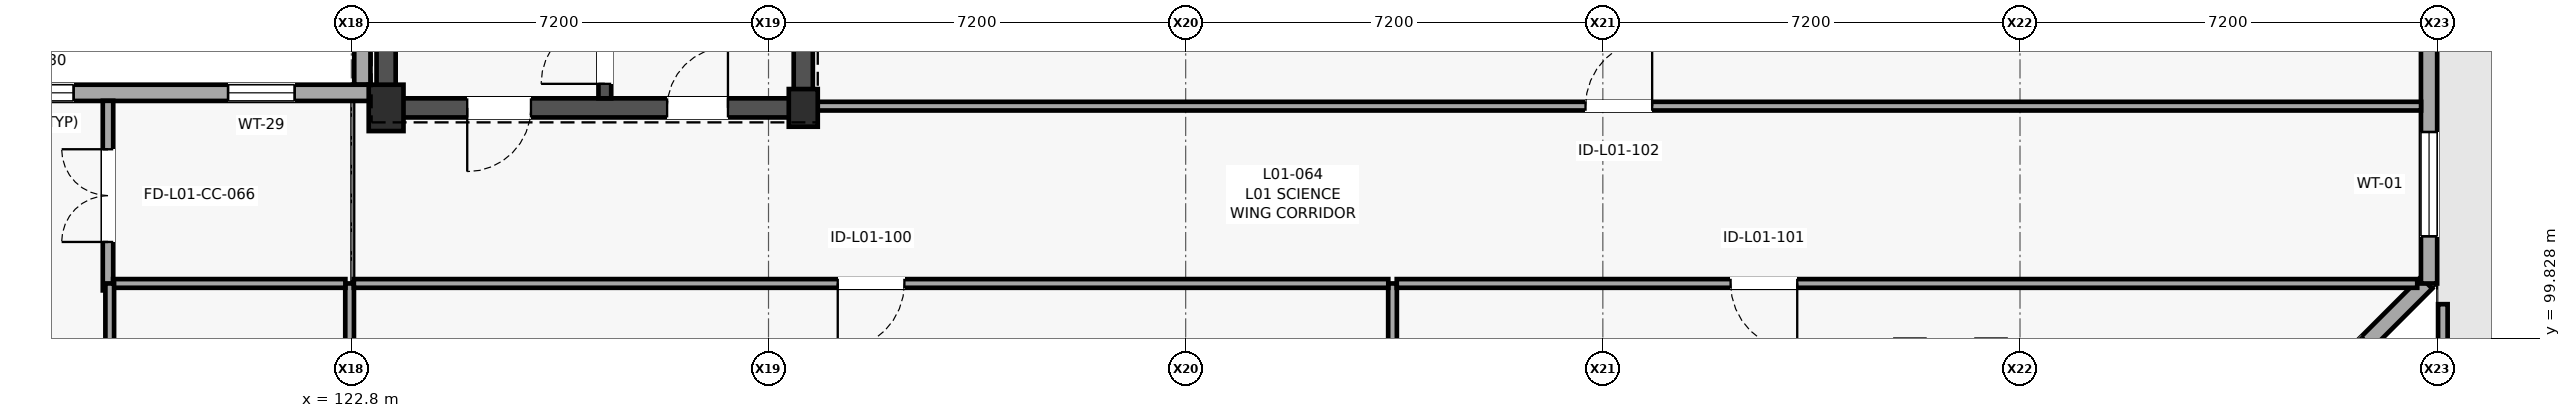
"""IFC4 building model, lengths in metres.
Left out: names, types, materials, properties, quantities, classifications, styles, units other than length and angle.
Written with IfcOpenShell. Run it as: python <this file> out.ifc"""

import sys

from ifc_helpers import new_model, si_unit, direction, frame, frame_2d, origin, origin_2d, place, context, subcontext, project, spatial, rectangle, extrude, element, fill, save


model = new_model("IFC4")
c1 = context("Model", 3, precision=1e-05, world=origin(), true_north=direction((0.0, 1.0)))
c2 = subcontext(c1, "Body", "Model", "MODEL_VIEW")
j1 = project(units=[si_unit("LENGTHUNIT", "METRE"), si_unit("PLANEANGLEUNIT", "RADIAN")], contexts=[c1])
p1 = place(None, origin())
s1 = spatial("IfcSite", under=j1, at=p1, CompositionType="ELEMENT")
p2 = place(p1, origin())
s2 = spatial("IfcBuilding", under=s1, at=p2, CompositionType="ELEMENT")
p3 = place(p2, frame((0.0, 0.0, 4.2)))
s3 = spatial("IfcBuildingStorey", under=s2, at=p3, CompositionType="ELEMENT", Elevation=4.2)
p4 = place(p3, frame((123.4, 103.8, 0.0), z_axis=(0.0, 0.0, 1.0), x_axis=(1.0, 0.0, 0.0)))
e1 = element("IfcColumn", 1, at=p4, inside=s3, PredefinedType="COLUMN", context=c2, shape_type="SweptSolid", body=[
    extrude(rectangle(XDim=0.6, YDim=0.8, at=origin_2d()), origin(), (0.0, 0.0, 1.0), 4.0),
])
p5 = place(p3, frame((130.6, 103.8, 0.0), z_axis=(0.0, 0.0, 1.0), x_axis=(1.0, 0.0, 0.0)))
e2 = element("IfcColumn", 2, at=p5, inside=s3, PredefinedType="COLUMN", context=c2, shape_type="SweptSolid", body=[
    extrude(rectangle(XDim=0.5, YDim=0.65, at=origin_2d()), origin(), (0.0, 0.0, 1.0), 4.0),
])
p6 = place(p3, frame((154.419, 96.584, 0.0), z_axis=(0.0, 0.0, 1.0), x_axis=(0.707106781187, 0.707106781187, 0.0)))
e3 = element("IfcWall", 3, at=p6, inside=s3, PredefinedType="SOLIDWALL", context=c2, shape_type="SweptSolid", body=[
    extrude(rectangle(XDim=5.936, YDim=0.28, at=frame_2d((2.968, 0.0))), origin(), (0.0, 0.0, 1.0), 3.78),
])
p7 = place(p6, frame((2.343, 0.0, 0.85)))
e4 = element("IfcOpeningElement", 4, at=p7, cuts=e3, PredefinedType="OPENING", context=c2, shape_type="SweptSolid", body=[
    extrude(rectangle(XDim=2.15, YDim=1.95, at=frame_2d((1.075, 0.975))), frame((0.0, 0.15, 0.0), z_axis=(0.0, -1.0, 0.0), x_axis=(1.0, 0.0, 0.0)), (0.0, 0.0, 1.0), 0.3),
])
p8 = place(p3, frame((158.66, 100.769, 0.0), z_axis=(0.0, 0.0, 1.0), x_axis=(0.0, 1.0, 0.0)))
e5 = element("IfcWall", 5, at=p8, inside=s3, PredefinedType="SOLIDWALL", context=c2, shape_type="SweptSolid", body=[
    extrude(rectangle(XDim=6.862, YDim=0.28, at=frame_2d((3.431, 0.0))), origin(), (0.0, 0.0, 1.0), 3.78),
])
p9 = place(p8, frame((0.815, 0.0, 0.85)))
e6 = element("IfcOpeningElement", 6, at=p9, cuts=e5, PredefinedType="OPENING", context=c2, shape_type="SweptSolid", body=[
    extrude(rectangle(XDim=1.8, YDim=1.8, at=frame_2d((0.9, 0.9))), frame((0.0, 0.15, 0.0), z_axis=(0.0, -1.0, 0.0), x_axis=(1.0, 0.0, 0.0)), (0.0, 0.0, 1.0), 0.3),
])
p10 = place(p8, frame((4.096, 0.0, 0.85)))
e7 = element("IfcOpeningElement", 7, at=p10, cuts=e5, PredefinedType="OPENING", context=c2, shape_type="SweptSolid", body=[
    extrude(rectangle(XDim=2.1, YDim=1.8, at=frame_2d((1.05, 0.9))), frame((0.0, 0.15, 0.0), z_axis=(0.0, -1.0, 0.0), x_axis=(1.0, 0.0, 0.0)), (0.0, 0.0, 1.0), 0.3),
])
p11 = place(p3, frame((122.99, 111.72, 0.0), z_axis=(0.0, 0.0, 1.0), x_axis=(0.0, -1.0, 0.0)))
e8 = element("IfcWall", 8, at=p11, inside=s3, PredefinedType="SOLIDWALL", context=c2, shape_type="SweptSolid", body=[
    extrude(rectangle(XDim=7.52, YDim=0.28, at=frame_2d((3.76, 0.0))), origin(), (0.0, 0.0, 1.0), 3.78),
])
p12 = place(p3, frame((123.13, 104.06, 0.0), z_axis=(0.0, 0.0, 1.0), x_axis=(-1.0, 0.0, 0.0)))
e9 = element("IfcWall", 9, at=p12, inside=s3, PredefinedType="SOLIDWALL", context=c2, shape_type="SweptSolid", body=[
    extrude(rectangle(XDim=7.53, YDim=0.28, at=frame_2d((3.765, 0.0))), origin(), (0.0, 0.0, 1.0), 3.78),
])
p13 = place(p12, frame((1.308, 0.0, 1.05)))
e10 = element("IfcOpeningElement", 10, at=p13, cuts=e9, PredefinedType="OPENING", context=c2, shape_type="SweptSolid", body=[
    extrude(rectangle(XDim=1.15, YDim=1.4, at=frame_2d((0.575, 0.7))), frame((0.0, 0.15, 0.0), z_axis=(0.0, -1.0, 0.0), x_axis=(1.0, 0.0, 0.0)), (0.0, 0.0, 1.0), 0.3),
])
p14 = place(p12, frame((5.123, 0.0, 1.05)))
e11 = element("IfcOpeningElement", 11, at=p14, cuts=e9, PredefinedType="OPENING", context=c2, shape_type="SweptSolid", body=[
    extrude(rectangle(XDim=1.05, YDim=1.3, at=frame_2d((0.525, 0.65))), frame((0.0, 0.15, 0.0), z_axis=(0.0, -1.0, 0.0), x_axis=(1.0, 0.0, 0.0)), (0.0, 0.0, 1.0), 0.3),
])
p15 = place(p3, frame((158.898, 100.412, 0.0), z_axis=(0.0, 0.0, 1.0), x_axis=(0.0, -1.0, 0.0)))
e12 = element("IfcWall", 12, at=p15, inside=s3, PredefinedType="PARAPET", context=c2, shape_type="SweptSolid", body=[
    extrude(rectangle(XDim=3.816, YDim=0.165, at=frame_2d((1.908, 0.0))), origin(), (0.0, 0.0, 1.0), 1.12),
])
p16 = place(p3, frame((123.235, 103.8, 0.0), z_axis=(0.0, 0.0, 1.0), x_axis=(1.0, 0.0, 0.0)))
e13 = element("IfcWall", 13, at=p16, inside=s3, PredefinedType="SHEAR", context=c2, shape_type="SweptSolid", body=[
    extrude(rectangle(XDim=7.53, YDim=0.33, at=frame_2d((3.765, 0.0))), origin(), (0.0, 0.0, 1.0), 3.78),
])
p17 = place(p16, frame((5.015, 0.0, 0.0)))
e14 = element("IfcOpeningElement", 14, at=p17, cuts=e13, PredefinedType="OPENING", context=c2, shape_type="SweptSolid", body=[
    extrude(rectangle(XDim=1.05, YDim=2.15, at=frame_2d((0.525, 1.075))), frame((0.0, 0.175, 0.0), z_axis=(0.0, -1.0, 0.0), x_axis=(1.0, 0.0, 0.0)), (0.0, 0.0, 1.0), 0.35),
])
p18 = place(p16, frame((1.565, 0.0, 0.0)))
e15 = element("IfcOpeningElement", 15, at=p18, cuts=e13, PredefinedType="OPENING", context=c2, shape_type="SweptSolid", body=[
    extrude(rectangle(XDim=1.1, YDim=2.15, at=frame_2d((0.55, 1.075))), frame((0.0, 0.175, 0.0), z_axis=(0.0, -1.0, 0.0), x_axis=(1.0, 0.0, 0.0)), (0.0, 0.0, 1.0), 0.35),
])
for number, where, z_axis, x_axis in (
    (16, (123.4, 103.965, 0.0), (0.0, 0.0, 1.0), (0.0, 1.0, 0.0)),
    (17, (130.6, 103.965, 0.0), (0.0, 0.0, 1.0), (0.0, 1.0, 0.0)),
):
    element("IfcWall", number, at=place(p3, frame(where, z_axis=z_axis, x_axis=x_axis)), inside=s3, PredefinedType="SHEAR", context=c2, shape_type="SweptSolid", body=[
        extrude(rectangle(XDim=7.47, YDim=0.33, at=frame_2d((3.735, 0.0))), origin(), (0.0, 0.0, 1.0), 3.78),
    ])
p19 = place(p3, frame((127.175, 103.965, 0.0), z_axis=(0.0, 0.0, 1.0), x_axis=(0.0, 1.0, 0.0)))
e18 = element("IfcWall", 18, at=p19, inside=s3, PredefinedType="SHEAR", context=c2, shape_type="SweptSolid", body=[
    extrude(rectangle(XDim=7.47, YDim=0.22, at=frame_2d((3.735, 0.0))), origin(), (0.0, 0.0, 1.0), 3.78),
])
p20 = place(p19, frame((0.25, 0.0, 0.0)))
e19 = element("IfcOpeningElement", 19, at=p20, cuts=e18, PredefinedType="OPENING", context=c2, shape_type="SweptSolid", body=[
    extrude(rectangle(XDim=1.1, YDim=2.15, at=frame_2d((0.55, 1.075))), frame((0.0, 0.12, 0.0), z_axis=(0.0, -1.0, 0.0), x_axis=(1.0, 0.0, 0.0)), (0.0, 0.0, 1.0), 0.24),
])
p21 = place(p3, frame((118.6, 100.65, 0.0), z_axis=(0.0, 0.0, 1.0), x_axis=(0.0, 1.0, 0.0)))
e20 = element("IfcWall", 20, at=p21, inside=s3, PredefinedType="PARTITIONING", context=c2, shape_type="SweptSolid", body=[
    extrude(rectangle(XDim=3.272, YDim=0.18, at=frame_2d((1.636, 0.0))), origin(), (0.0, 0.0, 1.0), 3.78),
])
p22 = place(p21, frame((0.836, 0.0, 0.0)))
e21 = element("IfcOpeningElement", 21, at=p22, cuts=e20, PredefinedType="OPENING", context=c2, shape_type="SweptSolid", body=[
    extrude(rectangle(XDim=1.6, YDim=2.25, at=frame_2d((0.8, 1.125))), frame((0.0, 0.1, 0.0), z_axis=(0.0, -1.0, 0.0), x_axis=(1.0, 0.0, 0.0)), (0.0, 0.0, 1.0), 0.2),
])
p23 = place(p3, frame((122.77, 96.678, 0.0), z_axis=(0.0, 0.0, 1.0), x_axis=(0.0, 1.0, 0.0)))
e22 = element("IfcWall", 22, at=p23, inside=s3, PredefinedType="PARTITIONING", context=c2, shape_type="SweptSolid", body=[
    extrude(rectangle(XDim=4.092, YDim=0.15, at=frame_2d((2.046, 0.0))), origin(), (0.0, 0.0, 1.0), 3.715),
])
p24 = place(p3, frame((122.697, 100.77, 0.0), z_axis=(0.0, 0.0, 1.0), x_axis=(-1.0, 0.0, 0.0)))
e23 = element("IfcWall", 23, at=p24, inside=s3, PredefinedType="PARTITIONING", context=c2, shape_type="SweptSolid", body=[
    extrude(rectangle(XDim=4.009, YDim=0.15, at=frame_2d((2.004, 0.0))), origin(), (0.0, 0.0, 1.0), 3.715),
])
p25 = place(p3, frame((118.63, 100.77, 0.0), z_axis=(0.0, 0.0, 1.0), x_axis=(0.0, -1.0, 0.0)))
e24 = element("IfcWall", 24, at=p25, inside=s3, PredefinedType="PARTITIONING", context=c2, shape_type="SweptSolid", body=[
    extrude(rectangle(XDim=10.922, YDim=0.15, at=frame_2d((5.461, 0.0))), origin(), (0.0, 0.0, 1.0), 3.215),
])
p26 = place(p25, frame((4.886, 0.0, 0.0)))
e25 = element("IfcOpeningElement", 25, at=p26, cuts=e24, PredefinedType="OPENING", context=c2, shape_type="SweptSolid", body=[
    extrude(rectangle(XDim=1.15, YDim=2.2, at=frame_2d((0.575, 1.1))), frame((0.0, 0.085, 0.0), z_axis=(0.0, -1.0, 0.0), x_axis=(1.0, 0.0, 0.0)), (0.0, 0.0, 1.0), 0.17),
])
p27 = place(p3, frame((140.77, 96.678, 0.0), z_axis=(0.0, 0.0, 1.0), x_axis=(0.0, 1.0, 0.0)))
e26 = element("IfcWall", 26, at=p27, inside=s3, PredefinedType="PARTITIONING", context=c2, shape_type="SweptSolid", body=[
    extrude(rectangle(XDim=4.092, YDim=0.15, at=frame_2d((2.046, 0.0))), origin(), (0.0, 0.0, 1.0), 3.715),
])
p28 = place(p3, frame((140.697, 100.77, 0.0), z_axis=(0.0, 0.0, 1.0), x_axis=(-1.0, 0.0, 0.0)))
e27 = element("IfcWall", 27, at=p28, inside=s3, PredefinedType="PARTITIONING", context=c2, shape_type="SweptSolid", body=[
    extrude(rectangle(XDim=17.854, YDim=0.15, at=frame_2d((8.927, 0.0))), origin(), (0.0, 0.0, 1.0), 3.715),
])
p29 = place(p28, frame((8.352, 0.0, 0.0)))
e28 = element("IfcOpeningElement", 28, at=p29, cuts=e27, PredefinedType="OPENING", context=c2, shape_type="SweptSolid", body=[
    extrude(rectangle(XDim=1.15, YDim=2.2, at=frame_2d((0.575, 1.1))), frame((0.0, 0.085, 0.0), z_axis=(0.0, -1.0, 0.0), x_axis=(1.0, 0.0, 0.0)), (0.0, 0.0, 1.0), 0.17),
])
p30 = place(p3, frame((158.456, 100.77, 0.0), z_axis=(0.0, 0.0, 1.0), x_axis=(-1.0, 0.0, 0.0)))
e29 = element("IfcWall", 29, at=p30, inside=s3, PredefinedType="PARTITIONING", context=c2, shape_type="SweptSolid", body=[
    extrude(rectangle(XDim=17.613, YDim=0.15, at=frame_2d((8.807, 0.0))), origin(), (0.0, 0.0, 1.0), 3.715),
])
p31 = place(p30, frame((10.701, 0.0, 0.0)))
e30 = element("IfcOpeningElement", 30, at=p31, cuts=e29, PredefinedType="OPENING", context=c2, shape_type="SweptSolid", body=[
    extrude(rectangle(XDim=1.15, YDim=2.2, at=frame_2d((0.575, 1.1))), frame((0.0, 0.085, 0.0), z_axis=(0.0, -1.0, 0.0), x_axis=(1.0, 0.0, 0.0)), (0.0, 0.0, 1.0), 0.17),
])
p32 = place(p3, frame((130.83, 103.83, 0.0), z_axis=(0.0, 0.0, 1.0), x_axis=(1.0, 0.0, 0.0)))
e31 = element("IfcWall", 31, at=p32, inside=s3, PredefinedType="PARTITIONING", context=c2, shape_type="SweptSolid", body=[
    extrude(rectangle(XDim=27.692, YDim=0.15, at=frame_2d((13.846, 0.0))), origin(), (0.0, 0.0, 1.0), 3.715),
])
p33 = place(p32, frame((13.271, 0.0, 0.0)))
e32 = element("IfcOpeningElement", 32, at=p33, cuts=e31, PredefinedType="OPENING", context=c2, shape_type="SweptSolid", body=[
    extrude(rectangle(XDim=1.15, YDim=2.2, at=frame_2d((0.575, 1.1))), frame((0.0, 0.085, 0.0), z_axis=(0.0, -1.0, 0.0), x_axis=(1.0, 0.0, 0.0)), (0.0, 0.0, 1.0), 0.17),
])
p34 = place(p9, origin())
e33 = element("IfcWindow", 33, at=p34, inside=s3, PartitioningType="SINGLE_PANEL", PredefinedType="WINDOW", context=c2, shape_type="SweptSolid", body=[
    extrude(rectangle(XDim=1.8, YDim=1.8, at=frame_2d((0.9, 0.9))), frame((0.0, 0.03, 0.0), z_axis=(0.0, -1.0, 0.0), x_axis=(1.0, 0.0, 0.0)), (0.0, 0.0, 1.0), 0.06),
])
fill(e6, e33)
p35 = place(p13, origin())
e34 = element("IfcWindow", 34, at=p35, inside=s3, PartitioningType="SINGLE_PANEL", PredefinedType="WINDOW", context=c2, shape_type="SweptSolid", body=[
    extrude(rectangle(XDim=1.15, YDim=1.4, at=frame_2d((0.575, 0.7))), frame((0.0, 0.03, 0.0), z_axis=(0.0, -1.0, 0.0), x_axis=(1.0, 0.0, 0.0)), (0.0, 0.0, 1.0), 0.06),
])
fill(e10, e34)
p36 = place(p14, origin())
e35 = element("IfcWindow", 35, at=p36, inside=s3, PartitioningType="SINGLE_PANEL", PredefinedType="WINDOW", context=c2, shape_type="SweptSolid", body=[
    extrude(rectangle(XDim=1.05, YDim=1.3, at=frame_2d((0.525, 0.65))), frame((0.0, 0.03, 0.0), z_axis=(0.0, -1.0, 0.0), x_axis=(1.0, 0.0, 0.0)), (0.0, 0.0, 1.0), 0.06),
])
fill(e11, e35)
p37 = place(p20, origin())
e36 = element("IfcDoor", 36, at=p37, inside=s3, OperationType="SINGLE_SWING_LEFT", PredefinedType="DOOR", context=c2, shape_type="SweptSolid", body=[
    extrude(rectangle(XDim=1.1, YDim=2.15, at=frame_2d((0.55, 1.075))), frame((0.0, 0.025, 0.0), z_axis=(0.0, -1.0, 0.0), x_axis=(1.0, 0.0, 0.0)), (0.0, 0.0, 1.0), 0.05),
])
fill(e19, e36)
p38 = place(p17, origin())
e37 = element("IfcDoor", 37, at=p38, inside=s3, OperationType="SINGLE_SWING_RIGHT", PredefinedType="DOOR", context=c2, shape_type="SweptSolid", body=[
    extrude(rectangle(XDim=1.05, YDim=2.15, at=frame_2d((0.525, 1.075))), frame((0.0, 0.025, 0.0), z_axis=(0.0, -1.0, 0.0), x_axis=(1.0, 0.0, 0.0)), (0.0, 0.0, 1.0), 0.05),
])
fill(e14, e37)
p39 = place(p18, frame((1.1, 0.0, 0.0), z_axis=(0.0, 0.0, 1.0), x_axis=(-1.0, 0.0, 0.0)))
e38 = element("IfcDoor", 38, at=p39, inside=s3, OperationType="SINGLE_SWING_LEFT", PredefinedType="DOOR", context=c2, shape_type="SweptSolid", body=[
    extrude(rectangle(XDim=1.1, YDim=2.15, at=frame_2d((0.55, 1.075))), frame((0.0, 0.025, 0.0), z_axis=(0.0, -1.0, 0.0), x_axis=(1.0, 0.0, 0.0)), (0.0, 0.0, 1.0), 0.05),
])
fill(e15, e38)
p40 = place(p22, origin())
e39 = element("IfcDoor", 39, at=p40, inside=s3, OperationType="DOUBLE_DOOR_SINGLE_SWING", PredefinedType="DOOR", context=c2, shape_type="SweptSolid", body=[
    extrude(rectangle(XDim=1.6, YDim=2.25, at=frame_2d((0.8, 1.125))), frame((0.0, 0.025, 0.0), z_axis=(0.0, -1.0, 0.0), x_axis=(1.0, 0.0, 0.0)), (0.0, 0.0, 1.0), 0.05),
])
fill(e21, e39)
p41 = place(p29, origin())
e40 = element("IfcDoor", 40, at=p41, inside=s3, OperationType="SINGLE_SWING_RIGHT", PredefinedType="DOOR", context=c2, shape_type="SweptSolid", body=[
    extrude(rectangle(XDim=1.15, YDim=2.2, at=frame_2d((0.575, 1.1))), frame((0.0, 0.025, 0.0), z_axis=(0.0, -1.0, 0.0), x_axis=(1.0, 0.0, 0.0)), (0.0, 0.0, 1.0), 0.05),
])
fill(e28, e40)
p42 = place(p31, origin())
e41 = element("IfcDoor", 41, at=p42, inside=s3, OperationType="SINGLE_SWING_LEFT", PredefinedType="DOOR", context=c2, shape_type="SweptSolid", body=[
    extrude(rectangle(XDim=1.15, YDim=2.2, at=frame_2d((0.575, 1.1))), frame((0.0, 0.025, 0.0), z_axis=(0.0, -1.0, 0.0), x_axis=(1.0, 0.0, 0.0)), (0.0, 0.0, 1.0), 0.05),
])
fill(e30, e41)
p43 = place(p33, origin())
e42 = element("IfcDoor", 42, at=p43, inside=s3, OperationType="SINGLE_SWING_RIGHT", PredefinedType="DOOR", context=c2, shape_type="SweptSolid", body=[
    extrude(rectangle(XDim=1.15, YDim=2.2, at=frame_2d((0.575, 1.1))), frame((0.0, 0.025, 0.0), z_axis=(0.0, -1.0, 0.0), x_axis=(1.0, 0.0, 0.0)), (0.0, 0.0, 1.0), 0.05),
])
fill(e32, e42)
save(model, sys.argv[1])
